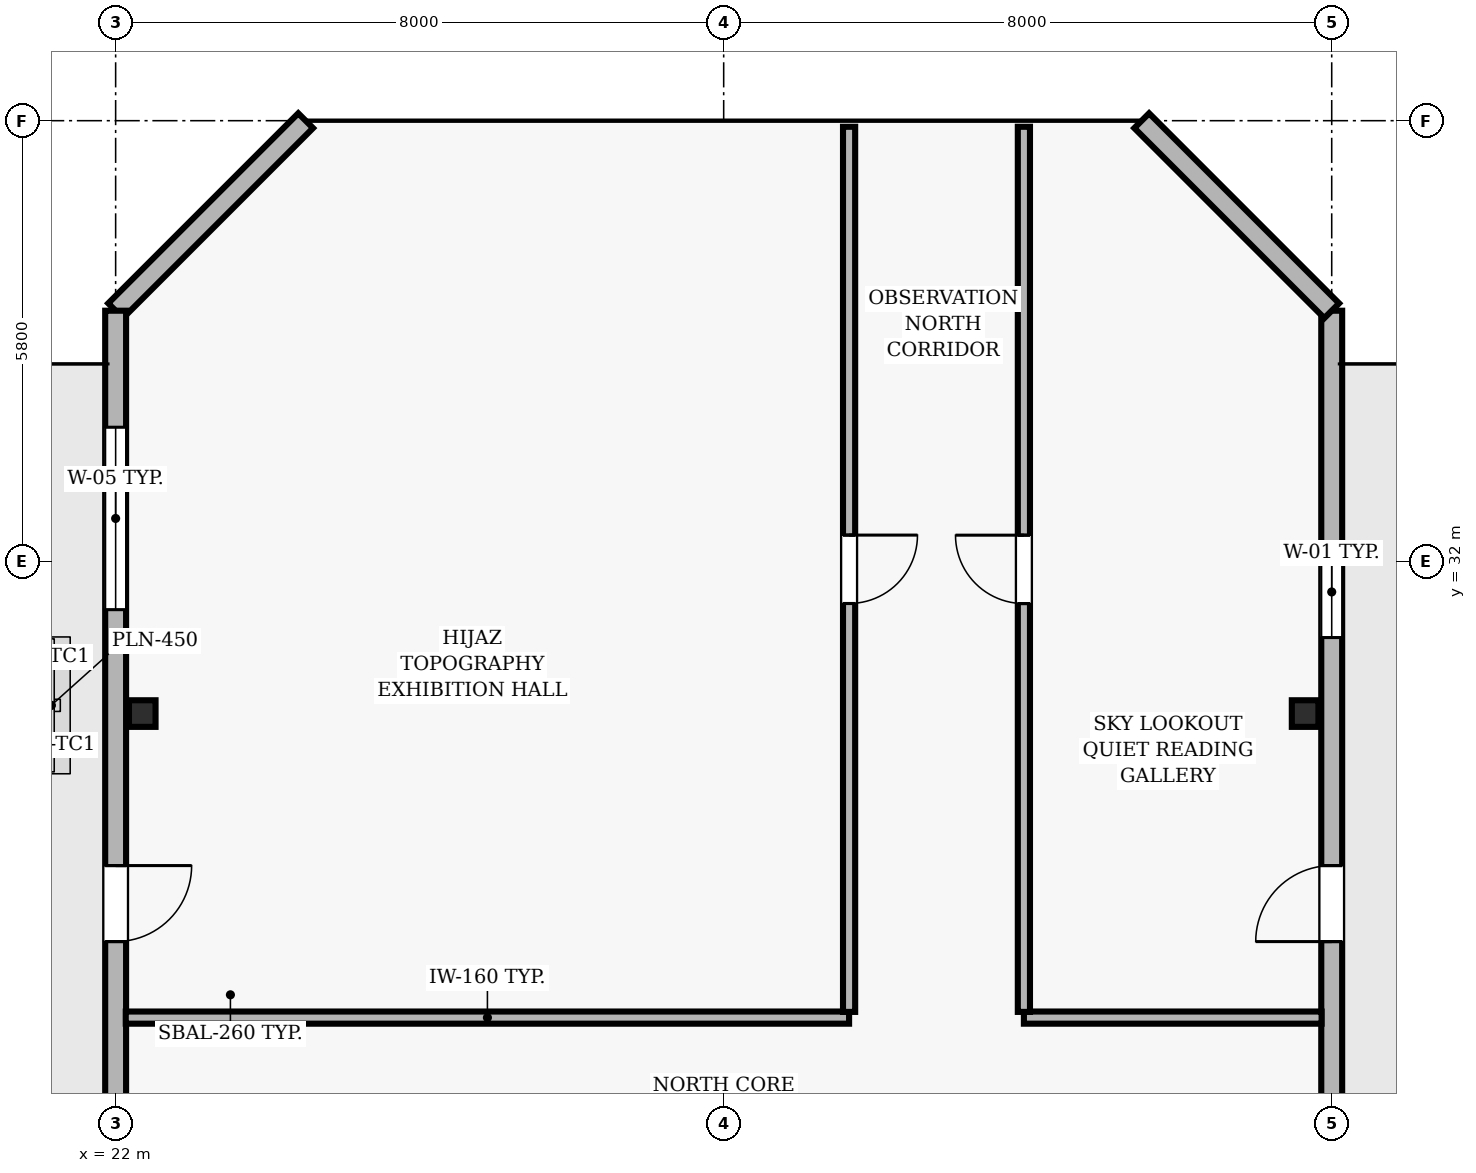
"""IFC4 building model, lengths in metres.
Left out: names, types, materials, properties, quantities, classifications, styles, units other than length and angle.
Written with IfcOpenShell. Run it as: python <this file> out.ifc"""

import sys

from ifc_helpers import new_model, si_unit, direction, frame, frame_2d, origin, origin_2d, place, context, subcontext, project, spatial, rectangle, hollow_rectangle, extrude, element, fill, save


model = new_model("IFC4")
c1 = context("Model", 3, precision=1e-05, world=origin(), true_north=direction((0.0, 1.0)))
c2 = subcontext(c1, "Body", "Model", "MODEL_VIEW")
j1 = project(units=[si_unit("LENGTHUNIT", "METRE"), si_unit("PLANEANGLEUNIT", "RADIAN")], contexts=[c1])
p1 = place(None, origin())
s1 = spatial("IfcSite", under=j1, at=p1, CompositionType="ELEMENT")
p2 = place(p1, origin())
s2 = spatial("IfcBuilding", under=s1, at=p2, CompositionType="ELEMENT")
p3 = place(p2, frame((0.0, 0.0, 311.7)))
s3 = spatial("IfcBuildingStorey", under=s2, at=p3, CompositionType="ELEMENT", Elevation=311.7)
for number, where, z_axis, x_axis in (
    (1, (22.35, 30.0, 0.0), (0.0, 0.0, 1.0), (1.0, 0.0, 0.0)),
    (2, (37.65, 30.0, 0.0), (0.0, 0.0, 1.0), (1.0, 0.0, 0.0)),
):
    element("IfcColumn", number, at=place(p3, frame(where, z_axis=z_axis, x_axis=x_axis)), inside=s3, PredefinedType="COLUMN", context=c2, shape_type="SweptSolid", body=[
        extrude(hollow_rectangle(XDim=0.35, YDim=0.35, WallThickness=0.016, at=origin_2d()), origin(), (0.0, 0.0, 1.0), 5.0),
    ])
p4 = place(p3, frame((38.0, 20.5, 0.0), z_axis=(0.0, 0.0, 1.0), x_axis=(0.0, 1.0, 0.0)))
e3 = element("IfcWall", 3, at=p4, inside=s3, PredefinedType="SOLIDWALL", context=c2, shape_type="SweptSolid", body=[
    extrude(rectangle(XDim=14.8, YDim=0.275, at=frame_2d((7.4, 0.0))), origin(), (0.0, 0.0, 1.0), 4.74),
])
p5 = place(p4, frame((6.5, 0.0, 0.0)))
e4 = element("IfcOpeningElement", 4, at=p5, cuts=e3, PredefinedType="OPENING", context=c2, shape_type="SweptSolid", body=[
    extrude(rectangle(XDim=1.0, YDim=2.2, at=frame_2d((0.5, 1.1))), frame((0.0, 0.147, 0.0), z_axis=(0.0, -1.0, 0.0), x_axis=(1.0, 0.0, 0.0)), (0.0, 0.0, 1.0), 0.295),
])
p6 = place(p4, frame((10.5, 0.0, 0.9)))
e5 = element("IfcOpeningElement", 5, at=p6, cuts=e3, PredefinedType="OPENING", context=c2, shape_type="SweptSolid", body=[
    extrude(rectangle(XDim=1.2, YDim=1.6, at=frame_2d((0.6, 0.8))), frame((0.0, 0.147, 0.0), z_axis=(0.0, -1.0, 0.0), x_axis=(1.0, 0.0, 0.0)), (0.0, 0.0, 1.0), 0.295),
])
for number, where, z_axis, x_axis in (
    (6, (38.0, 35.3, 0.0), (0.0, 0.0, 1.0), (-0.707, 0.707, 0.0)),
    (7, (24.5, 37.8, 0.0), (0.0, 0.0, 1.0), (-0.707, -0.707, 0.0)),
):
    element("IfcWall", number, at=place(p3, frame(where, z_axis=z_axis, x_axis=x_axis)), inside=s3, PredefinedType="SOLIDWALL", context=c2, shape_type="SweptSolid", body=[
        extrude(rectangle(XDim=3.536, YDim=0.275, at=frame_2d((1.768, 0.0))), origin(), (0.0, 0.0, 1.0), 4.74),
    ])
p7 = place(p3, frame((22.0, 35.3, 0.0), z_axis=(0.0, 0.0, 1.0), x_axis=(0.0, -1.0, 0.0)))
e8 = element("IfcWall", 8, at=p7, inside=s3, PredefinedType="SOLIDWALL", context=c2, shape_type="SweptSolid", body=[
    extrude(rectangle(XDim=32.8, YDim=0.275, at=frame_2d((16.4, 0.0))), origin(), (0.0, 0.0, 1.0), 4.74),
])
p8 = place(p7, frame((7.3, 0.0, 0.0)))
e9 = element("IfcOpeningElement", 9, at=p8, cuts=e8, PredefinedType="OPENING", context=c2, shape_type="SweptSolid", body=[
    extrude(rectangle(XDim=1.0, YDim=2.2, at=frame_2d((0.5, 1.1))), frame((0.0, 0.147, 0.0), z_axis=(0.0, -1.0, 0.0), x_axis=(1.0, 0.0, 0.0)), (0.0, 0.0, 1.0), 0.295),
])
p9 = place(p7, frame((1.533, 0.0, 0.9)))
e10 = element("IfcOpeningElement", 10, at=p9, cuts=e8, PredefinedType="OPENING", context=c2, shape_type="SweptSolid", body=[
    extrude(rectangle(XDim=2.4, YDim=1.6, at=frame_2d((1.2, 0.8))), frame((0.0, 0.147, 0.0), z_axis=(0.0, -1.0, 0.0), x_axis=(1.0, 0.0, 0.0)), (0.0, 0.0, 1.0), 0.295),
])
p10 = place(p7, frame((12.917, 0.0, 0.9)))
e11 = element("IfcOpeningElement", 11, at=p10, cuts=e8, PredefinedType="OPENING", context=c2, shape_type="SweptSolid", body=[
    extrude(rectangle(XDim=2.4, YDim=1.6, at=frame_2d((1.2, 0.8))), frame((0.0, 0.147, 0.0), z_axis=(0.0, -1.0, 0.0), x_axis=(1.0, 0.0, 0.0)), (0.0, 0.0, 1.0), 0.295),
])
p11 = place(p7, frame((17.483, 0.0, 0.9)))
e12 = element("IfcOpeningElement", 12, at=p11, cuts=e8, PredefinedType="OPENING", context=c2, shape_type="SweptSolid", body=[
    extrude(rectangle(XDim=2.4, YDim=1.6, at=frame_2d((1.2, 0.8))), frame((0.0, 0.147, 0.0), z_axis=(0.0, -1.0, 0.0), x_axis=(1.0, 0.0, 0.0)), (0.0, 0.0, 1.0), 0.295),
])
p12 = place(p7, frame((23.4, 0.0, 0.9)))
e13 = element("IfcOpeningElement", 13, at=p12, cuts=e8, PredefinedType="OPENING", context=c2, shape_type="SweptSolid", body=[
    extrude(rectangle(XDim=2.4, YDim=1.6, at=frame_2d((1.2, 0.8))), frame((0.0, 0.147, 0.0), z_axis=(0.0, -1.0, 0.0), x_axis=(1.0, 0.0, 0.0)), (0.0, 0.0, 1.0), 0.295),
])
p13 = place(p3, frame((31.65, 26.0, 0.0), z_axis=(0.0, 0.0, 1.0), x_axis=(-1.0, 0.0, 0.0)))
e14 = element("IfcWall", 14, at=p13, inside=s3, PredefinedType="PARTITIONING", context=c2, shape_type="SweptSolid", body=[
    extrude(rectangle(XDim=9.517, YDim=0.16, at=frame_2d((4.758, 0.0))), origin(), (0.0, 0.0, 1.0), 4.74),
])
p14 = place(p3, frame((37.867, 26.0, 0.0), z_axis=(0.0, 0.0, 1.0), x_axis=(-1.0, 0.0, 0.0)))
e15 = element("IfcWall", 15, at=p14, inside=s3, PredefinedType="PARTITIONING", context=c2, shape_type="SweptSolid", body=[
    extrude(rectangle(XDim=3.917, YDim=0.16, at=frame_2d((1.958, 0.0))), origin(), (0.0, 0.0, 1.0), 4.74),
])
p15 = place(p3, frame((31.65, 37.72, 0.0), z_axis=(0.0, 0.0, 1.0), x_axis=(0.0, -1.0, 0.0)))
e16 = element("IfcWall", 16, at=p15, inside=s3, PredefinedType="PARTITIONING", context=c2, shape_type="SweptSolid", body=[
    extrude(rectangle(XDim=11.645, YDim=0.16, at=frame_2d((5.823, 0.0))), origin(), (0.0, 0.0, 1.0), 4.74),
])
p16 = place(p15, frame((5.372, 0.0, 0.0)))
e17 = element("IfcOpeningElement", 17, at=p16, cuts=e16, PredefinedType="OPENING", context=c2, shape_type="SweptSolid", body=[
    extrude(rectangle(XDim=0.9, YDim=2.1, at=frame_2d((0.45, 1.05))), frame((0.0, 0.09, 0.0), z_axis=(0.0, -1.0, 0.0), x_axis=(1.0, 0.0, 0.0)), (0.0, 0.0, 1.0), 0.18),
])
p17 = place(p3, frame((33.95, 26.075, 0.0), z_axis=(0.0, 0.0, 1.0), x_axis=(0.0, 1.0, 0.0)))
e18 = element("IfcWall", 18, at=p17, inside=s3, PredefinedType="PARTITIONING", context=c2, shape_type="SweptSolid", body=[
    extrude(rectangle(XDim=11.645, YDim=0.16, at=frame_2d((5.823, 0.0))), origin(), (0.0, 0.0, 1.0), 4.74),
])
p18 = place(p17, frame((5.372, 0.0, 0.0)))
e19 = element("IfcOpeningElement", 19, at=p18, cuts=e18, PredefinedType="OPENING", context=c2, shape_type="SweptSolid", body=[
    extrude(rectangle(XDim=0.9, YDim=2.1, at=frame_2d((0.45, 1.05))), frame((0.0, 0.09, 0.0), z_axis=(0.0, -1.0, 0.0), x_axis=(1.0, 0.0, 0.0)), (0.0, 0.0, 1.0), 0.18),
])
p19 = place(p5, origin())
e20 = element("IfcDoor", 20, at=p19, inside=s3, OperationType="SINGLE_SWING_LEFT", PredefinedType="DOOR", context=c2, shape_type="SweptSolid", body=[
    extrude(rectangle(XDim=1.0, YDim=2.2, at=frame_2d((0.5, 1.1))), frame((0.0, 0.025, 0.0), z_axis=(0.0, -1.0, 0.0), x_axis=(1.0, 0.0, 0.0)), (0.0, 0.0, 1.0), 0.05),
])
fill(e4, e20)
p20 = place(p6, origin())
e21 = element("IfcWindow", 21, at=p20, inside=s3, PartitioningType="SINGLE_PANEL", PredefinedType="WINDOW", context=c2, shape_type="SweptSolid", body=[
    extrude(rectangle(XDim=1.2, YDim=1.6, at=frame_2d((0.6, 0.8))), frame((0.0, 0.03, 0.0), z_axis=(0.0, -1.0, 0.0), x_axis=(1.0, 0.0, 0.0)), (0.0, 0.0, 1.0), 0.06),
])
fill(e5, e21)
p21 = place(p8, origin())
e22 = element("IfcDoor", 22, at=p21, inside=s3, OperationType="SINGLE_SWING_LEFT", PredefinedType="DOOR", context=c2, shape_type="SweptSolid", body=[
    extrude(rectangle(XDim=1.0, YDim=2.2, at=frame_2d((0.5, 1.1))), frame((0.0, 0.025, 0.0), z_axis=(0.0, -1.0, 0.0), x_axis=(1.0, 0.0, 0.0)), (0.0, 0.0, 1.0), 0.05),
])
fill(e9, e22)
p22 = place(p9, origin())
e23 = element("IfcWindow", 23, at=p22, inside=s3, PartitioningType="SINGLE_PANEL", PredefinedType="WINDOW", context=c2, shape_type="SweptSolid", body=[
    extrude(rectangle(XDim=2.4, YDim=1.6, at=frame_2d((1.2, 0.8))), frame((0.0, 0.03, 0.0), z_axis=(0.0, -1.0, 0.0), x_axis=(1.0, 0.0, 0.0)), (0.0, 0.0, 1.0), 0.06),
])
fill(e10, e23)
p23 = place(p16, origin())
e24 = element("IfcDoor", 24, at=p23, inside=s3, OperationType="SINGLE_SWING_LEFT", PredefinedType="DOOR", context=c2, shape_type="SweptSolid", body=[
    extrude(rectangle(XDim=0.9, YDim=2.1, at=frame_2d((0.45, 1.05))), frame((0.0, 0.025, 0.0), z_axis=(0.0, -1.0, 0.0), x_axis=(1.0, 0.0, 0.0)), (0.0, 0.0, 1.0), 0.05),
])
fill(e17, e24)
p24 = place(p18, origin())
e25 = element("IfcDoor", 25, at=p24, inside=s3, OperationType="SINGLE_SWING_RIGHT", PredefinedType="DOOR", context=c2, shape_type="SweptSolid", body=[
    extrude(rectangle(XDim=0.9, YDim=2.1, at=frame_2d((0.45, 1.05))), frame((0.0, 0.025, 0.0), z_axis=(0.0, -1.0, 0.0), x_axis=(1.0, 0.0, 0.0)), (0.0, 0.0, 1.0), 0.05),
])
fill(e19, e25)
save(model, sys.argv[1])
